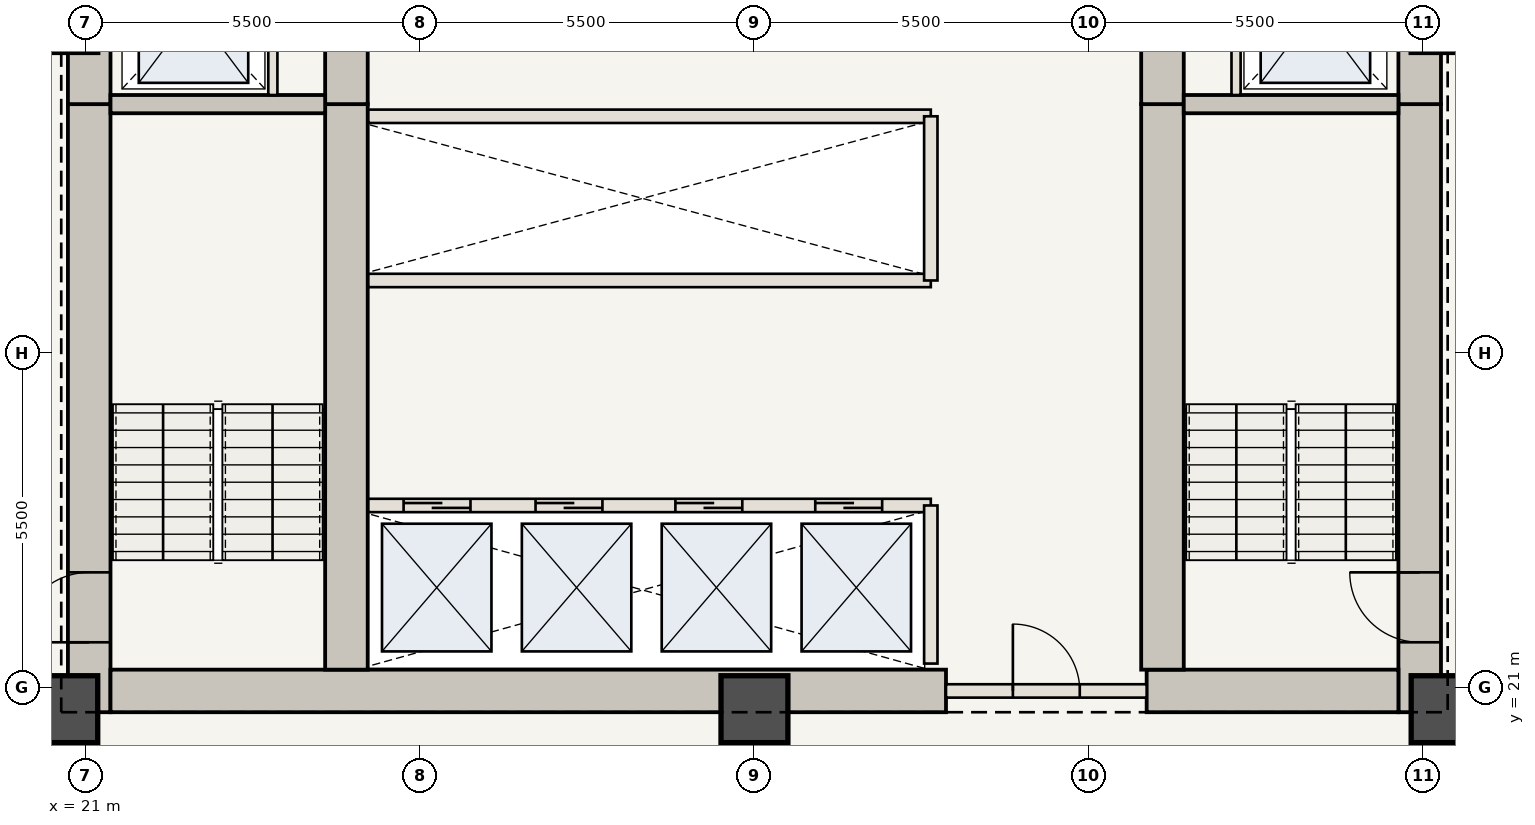
"""IFC4 building model, lengths in metres.
Left out: names, types, materials, properties, quantities, classifications, styles, units other than length and angle.
Written with IfcOpenShell. Run it as: python <this file> out.ifc"""

import sys

from ifc_helpers import new_model, si_unit, direction, frame, frame_2d, origin, origin_2d, place, context, subcontext, project, spatial, rectangle, extrude, element, fill, save


model = new_model("IFC4")
c1 = context("Model", 3, precision=1e-05, world=origin(), true_north=direction((0.0, 1.0)))
c2 = subcontext(c1, "Body", "Model", "MODEL_VIEW")
j1 = project(units=[si_unit("LENGTHUNIT", "METRE"), si_unit("PLANEANGLEUNIT", "RADIAN")], contexts=[c1])
p1 = place(None, origin())
s1 = spatial("IfcSite", under=j1, at=p1, CompositionType="ELEMENT")
p2 = place(p1, origin())
s2 = spatial("IfcBuilding", under=s1, at=p2, CompositionType="ELEMENT")
p3 = place(p2, frame((0.0, 0.0, 89.25)))
s3 = spatial("IfcBuildingStorey", under=s2, at=p3, CompositionType="ELEMENT", Elevation=89.25)
p4 = place(p3, frame((21.06, 20.6, 0.0), z_axis=(0.0, 0.0, 1.0), x_axis=(0.0, 1.0, 0.0)))
e1 = element("IfcWall", 1, at=p4, inside=s3, PredefinedType="SHEAR", context=c2, shape_type="SweptSolid", body=[
    extrude(rectangle(XDim=10.0, YDim=0.7, at=frame_2d((5.0, 0.0))), origin(), (0.0, 0.0, 1.0), 3.5),
])
p5 = place(p4, frame((1.15, 0.0, 0.0)))
e2 = element("IfcOpeningElement", 2, at=p5, cuts=e1, PredefinedType="OPENING", context=c2, shape_type="SweptSolid", body=[
    extrude(rectangle(XDim=1.15, YDim=2.15, at=frame_2d((0.575, 1.075))), frame((0.0, 0.36, 0.0), z_axis=(0.0, -1.0, 0.0), x_axis=(1.0, 0.0, 0.0)), (0.0, 0.0, 1.0), 0.72),
])
p6 = place(p3, frame((21.06, 30.6, 0.0), z_axis=(0.0, 0.0, 1.0), x_axis=(0.0, 1.0, 0.0)))
e3 = element("IfcWall", 3, at=p6, inside=s3, PredefinedType="SHEAR", context=c2, shape_type="SweptSolid", body=[
    extrude(rectangle(XDim=12.75, YDim=0.7, at=frame_2d((6.375, 0.0))), origin(), (0.0, 0.0, 1.0), 3.5),
])
p7 = place(p6, frame((4.2, 0.0, 0.0)))
e4 = element("IfcOpeningElement", 4, at=p7, cuts=e3, PredefinedType="OPENING", context=c2, shape_type="SweptSolid", body=[
    extrude(rectangle(XDim=1.1, YDim=2.15, at=frame_2d((0.55, 1.075))), frame((0.0, 0.36, 0.0), z_axis=(0.0, -1.0, 0.0), x_axis=(1.0, 0.0, 0.0)), (0.0, 0.0, 1.0), 0.72),
])
p8 = place(p6, frame((8.05, 0.0, 0.0)))
e5 = element("IfcOpeningElement", 5, at=p8, cuts=e3, PredefinedType="OPENING", context=c2, shape_type="SweptSolid", body=[
    extrude(rectangle(XDim=0.92, YDim=2.1, at=frame_2d((0.46, 1.05))), frame((0.0, 0.36, 0.0), z_axis=(0.0, -1.0, 0.0), x_axis=(1.0, 0.0, 0.0)), (0.0, 0.0, 1.0), 0.72),
])
p9 = place(p6, frame((9.45, 0.0, 0.0)))
e6 = element("IfcOpeningElement", 6, at=p9, cuts=e3, PredefinedType="OPENING", context=c2, shape_type="SweptSolid", body=[
    extrude(rectangle(XDim=0.88, YDim=2.1, at=frame_2d((0.44, 1.05))), frame((0.0, 0.36, 0.0), z_axis=(0.0, -1.0, 0.0), x_axis=(1.0, 0.0, 0.0)), (0.0, 0.0, 1.0), 0.72),
])
p10 = place(p6, frame((10.85, 0.0, 0.0)))
e7 = element("IfcOpeningElement", 7, at=p10, cuts=e3, PredefinedType="OPENING", context=c2, shape_type="SweptSolid", body=[
    extrude(rectangle(XDim=0.88, YDim=2.1, at=frame_2d((0.44, 1.05))), frame((0.0, 0.36, 0.0), z_axis=(0.0, -1.0, 0.0), x_axis=(1.0, 0.0, 0.0)), (0.0, 0.0, 1.0), 0.72),
])
p11 = place(p3, frame((42.94, 20.6, 0.0), z_axis=(0.0, 0.0, 1.0), x_axis=(0.0, 1.0, 0.0)))
e8 = element("IfcWall", 8, at=p11, inside=s3, PredefinedType="SHEAR", context=c2, shape_type="SweptSolid", body=[
    extrude(rectangle(XDim=10.0, YDim=0.7, at=frame_2d((5.0, 0.0))), origin(), (0.0, 0.0, 1.0), 3.5),
])
p12 = place(p11, frame((1.15, 0.0, 0.0)))
e9 = element("IfcOpeningElement", 9, at=p12, cuts=e8, PredefinedType="OPENING", context=c2, shape_type="SweptSolid", body=[
    extrude(rectangle(XDim=1.15, YDim=2.15, at=frame_2d((0.575, 1.075))), frame((0.0, 0.36, 0.0), z_axis=(0.0, -1.0, 0.0), x_axis=(1.0, 0.0, 0.0)), (0.0, 0.0, 1.0), 0.72),
])
p13 = place(p3, frame((42.94, 30.6, 0.0), z_axis=(0.0, 0.0, 1.0), x_axis=(0.0, 1.0, 0.0)))
e10 = element("IfcWall", 10, at=p13, inside=s3, PredefinedType="SHEAR", context=c2, shape_type="SweptSolid", body=[
    extrude(rectangle(XDim=12.75, YDim=0.7, at=frame_2d((6.375, 0.0))), origin(), (0.0, 0.0, 1.0), 3.5),
])
p14 = place(p13, frame((4.2, 0.0, 0.0)))
e11 = element("IfcOpeningElement", 11, at=p14, cuts=e10, PredefinedType="OPENING", context=c2, shape_type="SweptSolid", body=[
    extrude(rectangle(XDim=1.1, YDim=2.15, at=frame_2d((0.55, 1.075))), frame((0.0, 0.36, 0.0), z_axis=(0.0, -1.0, 0.0), x_axis=(1.0, 0.0, 0.0)), (0.0, 0.0, 1.0), 0.72),
])
p15 = place(p13, frame((9.2, 0.0, 0.0)))
e12 = element("IfcOpeningElement", 12, at=p15, cuts=e10, PredefinedType="OPENING", context=c2, shape_type="SweptSolid", body=[
    extrude(rectangle(XDim=0.92, YDim=2.1, at=frame_2d((0.46, 1.05))), frame((0.0, 0.36, 0.0), z_axis=(0.0, -1.0, 0.0), x_axis=(1.0, 0.0, 0.0)), (0.0, 0.0, 1.0), 0.72),
])
p16 = place(p3, frame((21.41, 20.95, 0.0), z_axis=(0.0, 0.0, 1.0), x_axis=(1.0, 0.0, 0.0)))
e13 = element("IfcWall", 13, at=p16, inside=s3, PredefinedType="SHEAR", context=c2, shape_type="SweptSolid", body=[
    extrude(rectangle(XDim=13.74, YDim=0.7, at=frame_2d((6.87, 0.0))), origin(), (0.0, 0.0, 1.0), 3.5),
])
p17 = place(p3, frame((38.45, 20.95, 0.0), z_axis=(0.0, 0.0, 1.0), x_axis=(1.0, 0.0, 0.0)))
e14 = element("IfcWall", 14, at=p17, inside=s3, PredefinedType="SHEAR", context=c2, shape_type="SweptSolid", body=[
    extrude(rectangle(XDim=4.14, YDim=0.7, at=frame_2d((2.07, 0.0))), origin(), (0.0, 0.0, 1.0), 3.5),
])
p18 = place(p3, frame((25.29, 21.3, 0.0), z_axis=(0.0, 0.0, 1.0), x_axis=(0.0, 1.0, 0.0)))
e15 = element("IfcWall", 15, at=p18, inside=s3, PredefinedType="SHEAR", context=c2, shape_type="SweptSolid", body=[
    extrude(rectangle(XDim=9.3, YDim=0.7, at=frame_2d((4.65, 0.0))), origin(), (0.0, 0.0, 1.0), 3.5),
])
p19 = place(p3, frame((25.29, 30.6, 0.0), z_axis=(0.0, 0.0, 1.0), x_axis=(0.0, 1.0, 0.0)))
e16 = element("IfcWall", 16, at=p19, inside=s3, PredefinedType="SHEAR", context=c2, shape_type="SweptSolid", body=[
    extrude(rectangle(XDim=12.05, YDim=0.7, at=frame_2d((6.025, 0.0))), origin(), (0.0, 0.0, 1.0), 3.5),
])
p20 = place(p19, frame((6.25, 0.0, 0.0)))
e17 = element("IfcOpeningElement", 17, at=p20, cuts=e16, PredefinedType="OPENING", context=c2, shape_type="SweptSolid", body=[
    extrude(rectangle(XDim=1.1, YDim=2.15, at=frame_2d((0.55, 1.075))), frame((0.0, 0.36, 0.0), z_axis=(0.0, -1.0, 0.0), x_axis=(1.0, 0.0, 0.0)), (0.0, 0.0, 1.0), 0.72),
])
p21 = place(p3, frame((38.71, 21.3, 0.0), z_axis=(0.0, 0.0, 1.0), x_axis=(0.0, 1.0, 0.0)))
e18 = element("IfcWall", 18, at=p21, inside=s3, PredefinedType="SHEAR", context=c2, shape_type="SweptSolid", body=[
    extrude(rectangle(XDim=9.3, YDim=0.7, at=frame_2d((4.65, 0.0))), origin(), (0.0, 0.0, 1.0), 3.5),
])
p22 = place(p3, frame((38.71, 30.6, 0.0), z_axis=(0.0, 0.0, 1.0), x_axis=(0.0, 1.0, 0.0)))
e19 = element("IfcWall", 19, at=p22, inside=s3, PredefinedType="SHEAR", context=c2, shape_type="SweptSolid", body=[
    extrude(rectangle(XDim=12.05, YDim=0.7, at=frame_2d((6.025, 0.0))), origin(), (0.0, 0.0, 1.0), 3.5),
])
for number, where, z_axis, x_axis in (
    (20, (20.65, 20.65, 0.0), (0.0, 0.0, 1.0), (1.0, 0.0, 0.0)),
    (21, (32.0, 20.65, 0.0), (0.0, 0.0, 1.0), (1.0, 0.0, 0.0)),
    (22, (43.35, 20.65, 0.0), (0.0, 0.0, 1.0), (1.0, 0.0, 0.0)),
):
    element("IfcColumn", number, at=place(p3, frame(where, z_axis=z_axis, x_axis=x_axis)), inside=s3, PredefinedType="COLUMN", context=c2, shape_type="SweptSolid", body=[
        extrude(rectangle(XDim=1.1, YDim=1.1, at=origin_2d()), origin(), (0.0, 0.0, 1.0), 3.5),
    ])
for number, where, z_axis, x_axis in (
    (23, (21.41, 30.6, 0.0), (0.0, 0.0, 1.0), (1.0, 0.0, 0.0)),
    (24, (39.06, 30.6, 0.0), (0.0, 0.0, 1.0), (1.0, 0.0, 0.0)),
):
    element("IfcWall", number, at=place(p3, frame(where, z_axis=z_axis, x_axis=x_axis)), inside=s3, PredefinedType="SHEAR", context=c2, shape_type="SweptSolid", body=[
        extrude(rectangle(XDim=3.53, YDim=0.3, at=frame_2d((1.765, 0.0))), origin(), (0.0, 0.0, 1.0), 3.32),
    ])
for number, where, z_axis, x_axis in (
    (25, (24.08, 30.75, 0.0), (0.0, 0.0, 1.0), (0.0, 1.0, 0.0)),
    (26, (39.92, 30.75, 0.0), (0.0, 0.0, 1.0), (0.0, 1.0, 0.0)),
):
    element("IfcWall", number, at=place(p3, frame(where, z_axis=z_axis, x_axis=x_axis)), inside=s3, PredefinedType="STANDARD", context=c2, shape_type="SweptSolid", body=[
        extrude(rectangle(XDim=2.65, YDim=0.15, at=frame_2d((1.325, 0.0))), origin(), (0.0, 0.0, 1.0), 3.32),
    ])
p23 = place(p3, frame((35.15, 20.95, 0.0), z_axis=(0.0, 0.0, 1.0), x_axis=(1.0, 0.0, 0.0)))
e27 = element("IfcWall", 27, at=p23, inside=s3, PredefinedType="STANDARD", context=c2, shape_type="SweptSolid", body=[
    extrude(rectangle(XDim=3.3, YDim=0.22, at=frame_2d((1.65, 0.0))), origin(), (0.0, 0.0, 1.0), 3.32),
])
p24 = place(p23, frame((1.1, 0.0, 0.0)))
e28 = element("IfcOpeningElement", 28, at=p24, cuts=e27, PredefinedType="OPENING", context=c2, shape_type="SweptSolid", body=[
    extrude(rectangle(XDim=1.1, YDim=2.15, at=frame_2d((0.55, 1.075))), frame((0.0, 0.12, 0.0), z_axis=(0.0, -1.0, 0.0), x_axis=(1.0, 0.0, 0.0)), (0.0, 0.0, 1.0), 0.24),
])
p25 = place(p3, frame((25.65, 24.0, 0.0), z_axis=(0.0, 0.0, 1.0), x_axis=(1.0, 0.0, 0.0)))
e29 = element("IfcWall", 29, at=p25, inside=s3, PredefinedType="STANDARD", context=c2, shape_type="SweptSolid", body=[
    extrude(rectangle(XDim=9.25, YDim=0.22, at=frame_2d((4.625, 0.0))), origin(), (0.0, 0.0, 1.0), 3.32),
])
p26 = place(p25, frame((0.58, 0.0, 0.0)))
e30 = element("IfcOpeningElement", 30, at=p26, cuts=e29, PredefinedType="OPENING", context=c2, shape_type="SweptSolid", body=[
    extrude(rectangle(XDim=1.1, YDim=2.15, at=frame_2d((0.55, 1.075))), frame((0.0, 0.12, 0.0), z_axis=(0.0, -1.0, 0.0), x_axis=(1.0, 0.0, 0.0)), (0.0, 0.0, 1.0), 0.24),
])
p27 = place(p25, frame((2.75, 0.0, 0.0)))
e31 = element("IfcOpeningElement", 31, at=p27, cuts=e29, PredefinedType="OPENING", context=c2, shape_type="SweptSolid", body=[
    extrude(rectangle(XDim=1.1, YDim=2.15, at=frame_2d((0.55, 1.075))), frame((0.0, 0.12, 0.0), z_axis=(0.0, -1.0, 0.0), x_axis=(1.0, 0.0, 0.0)), (0.0, 0.0, 1.0), 0.24),
])
p28 = place(p25, frame((5.05, 0.0, 0.0)))
e32 = element("IfcOpeningElement", 32, at=p28, cuts=e29, PredefinedType="OPENING", context=c2, shape_type="SweptSolid", body=[
    extrude(rectangle(XDim=1.1, YDim=2.15, at=frame_2d((0.55, 1.075))), frame((0.0, 0.12, 0.0), z_axis=(0.0, -1.0, 0.0), x_axis=(1.0, 0.0, 0.0)), (0.0, 0.0, 1.0), 0.24),
])
p29 = place(p25, frame((7.35, 0.0, 0.0)))
e33 = element("IfcOpeningElement", 33, at=p29, cuts=e29, PredefinedType="OPENING", context=c2, shape_type="SweptSolid", body=[
    extrude(rectangle(XDim=1.1, YDim=2.15, at=frame_2d((0.55, 1.075))), frame((0.0, 0.12, 0.0), z_axis=(0.0, -1.0, 0.0), x_axis=(1.0, 0.0, 0.0)), (0.0, 0.0, 1.0), 0.24),
])
p30 = place(p3, frame((34.9, 21.4, 0.0), z_axis=(0.0, 0.0, 1.0), x_axis=(0.0, 1.0, 0.0)))
e34 = element("IfcWall", 34, at=p30, inside=s3, PredefinedType="STANDARD", context=c2, shape_type="SweptSolid", body=[
    extrude(rectangle(XDim=2.6, YDim=0.22, at=frame_2d((1.3, 0.0))), origin(), (0.0, 0.0, 1.0), 3.32),
])
for number, where, z_axis, x_axis in (
    (35, (25.65, 27.7, 0.0), (0.0, 0.0, 1.0), (1.0, 0.0, 0.0)),
    (36, (25.65, 30.4, 0.0), (0.0, 0.0, 1.0), (1.0, 0.0, 0.0)),
):
    element("IfcWall", number, at=place(p3, frame(where, z_axis=z_axis, x_axis=x_axis)), inside=s3, PredefinedType="STANDARD", context=c2, shape_type="SweptSolid", body=[
        extrude(rectangle(XDim=9.25, YDim=0.22, at=frame_2d((4.625, 0.0))), origin(), (0.0, 0.0, 1.0), 3.32),
    ])
p31 = place(p3, frame((34.9, 27.7, 0.0), z_axis=(0.0, 0.0, 1.0), x_axis=(0.0, 1.0, 0.0)))
e37 = element("IfcWall", 37, at=p31, inside=s3, PredefinedType="STANDARD", context=c2, shape_type="SweptSolid", body=[
    extrude(rectangle(XDim=2.7, YDim=0.22, at=frame_2d((1.35, 0.0))), origin(), (0.0, 0.0, 1.0), 3.32),
])
p32 = place(p5, origin())
e38 = element("IfcDoor", 38, at=p32, inside=s3, OperationType="SINGLE_SWING_LEFT", PredefinedType="DOOR", context=c2, shape_type="SweptSolid", body=[
    extrude(rectangle(XDim=1.15, YDim=2.15, at=frame_2d((0.575, 1.075))), frame((0.0, 0.025, 0.0), z_axis=(0.0, -1.0, 0.0), x_axis=(1.0, 0.0, 0.0)), (0.0, 0.0, 1.0), 0.05),
])
fill(e2, e38)
p33 = place(p12, origin())
e39 = element("IfcDoor", 39, at=p33, inside=s3, OperationType="SINGLE_SWING_RIGHT", PredefinedType="DOOR", context=c2, shape_type="SweptSolid", body=[
    extrude(rectangle(XDim=1.15, YDim=2.15, at=frame_2d((0.575, 1.075))), frame((0.0, 0.025, 0.0), z_axis=(0.0, -1.0, 0.0), x_axis=(1.0, 0.0, 0.0)), (0.0, 0.0, 1.0), 0.05),
])
fill(e9, e39)
p34 = place(p24, origin())
e40 = element("IfcDoor", 40, at=p34, inside=s3, OperationType="SINGLE_SWING_LEFT", PredefinedType="DOOR", context=c2, shape_type="SweptSolid", body=[
    extrude(rectangle(XDim=1.1, YDim=2.15, at=frame_2d((0.55, 1.075))), frame((0.0, 0.025, 0.0), z_axis=(0.0, -1.0, 0.0), x_axis=(1.0, 0.0, 0.0)), (0.0, 0.0, 1.0), 0.05),
])
fill(e28, e40)
p35 = place(p26, origin())
e41 = element("IfcDoor", 41, at=p35, inside=s3, OperationType="DOUBLE_DOOR_SLIDING", PredefinedType="DOOR", context=c2, shape_type="SweptSolid", body=[
    extrude(rectangle(XDim=1.1, YDim=2.15, at=frame_2d((0.55, 1.075))), frame((0.0, 0.025, 0.0), z_axis=(0.0, -1.0, 0.0), x_axis=(1.0, 0.0, 0.0)), (0.0, 0.0, 1.0), 0.05),
])
fill(e30, e41)
p36 = place(p27, origin())
e42 = element("IfcDoor", 42, at=p36, inside=s3, OperationType="DOUBLE_DOOR_SLIDING", PredefinedType="DOOR", context=c2, shape_type="SweptSolid", body=[
    extrude(rectangle(XDim=1.1, YDim=2.15, at=frame_2d((0.55, 1.075))), frame((0.0, 0.025, 0.0), z_axis=(0.0, -1.0, 0.0), x_axis=(1.0, 0.0, 0.0)), (0.0, 0.0, 1.0), 0.05),
])
fill(e31, e42)
p37 = place(p28, origin())
e43 = element("IfcDoor", 43, at=p37, inside=s3, OperationType="DOUBLE_DOOR_SLIDING", PredefinedType="DOOR", context=c2, shape_type="SweptSolid", body=[
    extrude(rectangle(XDim=1.1, YDim=2.15, at=frame_2d((0.55, 1.075))), frame((0.0, 0.025, 0.0), z_axis=(0.0, -1.0, 0.0), x_axis=(1.0, 0.0, 0.0)), (0.0, 0.0, 1.0), 0.05),
])
fill(e32, e43)
p38 = place(p29, origin())
e44 = element("IfcDoor", 44, at=p38, inside=s3, OperationType="DOUBLE_DOOR_SLIDING", PredefinedType="DOOR", context=c2, shape_type="SweptSolid", body=[
    extrude(rectangle(XDim=1.1, YDim=2.15, at=frame_2d((0.55, 1.075))), frame((0.0, 0.025, 0.0), z_axis=(0.0, -1.0, 0.0), x_axis=(1.0, 0.0, 0.0)), (0.0, 0.0, 1.0), 0.05),
])
fill(e33, e44)
save(model, sys.argv[1])
